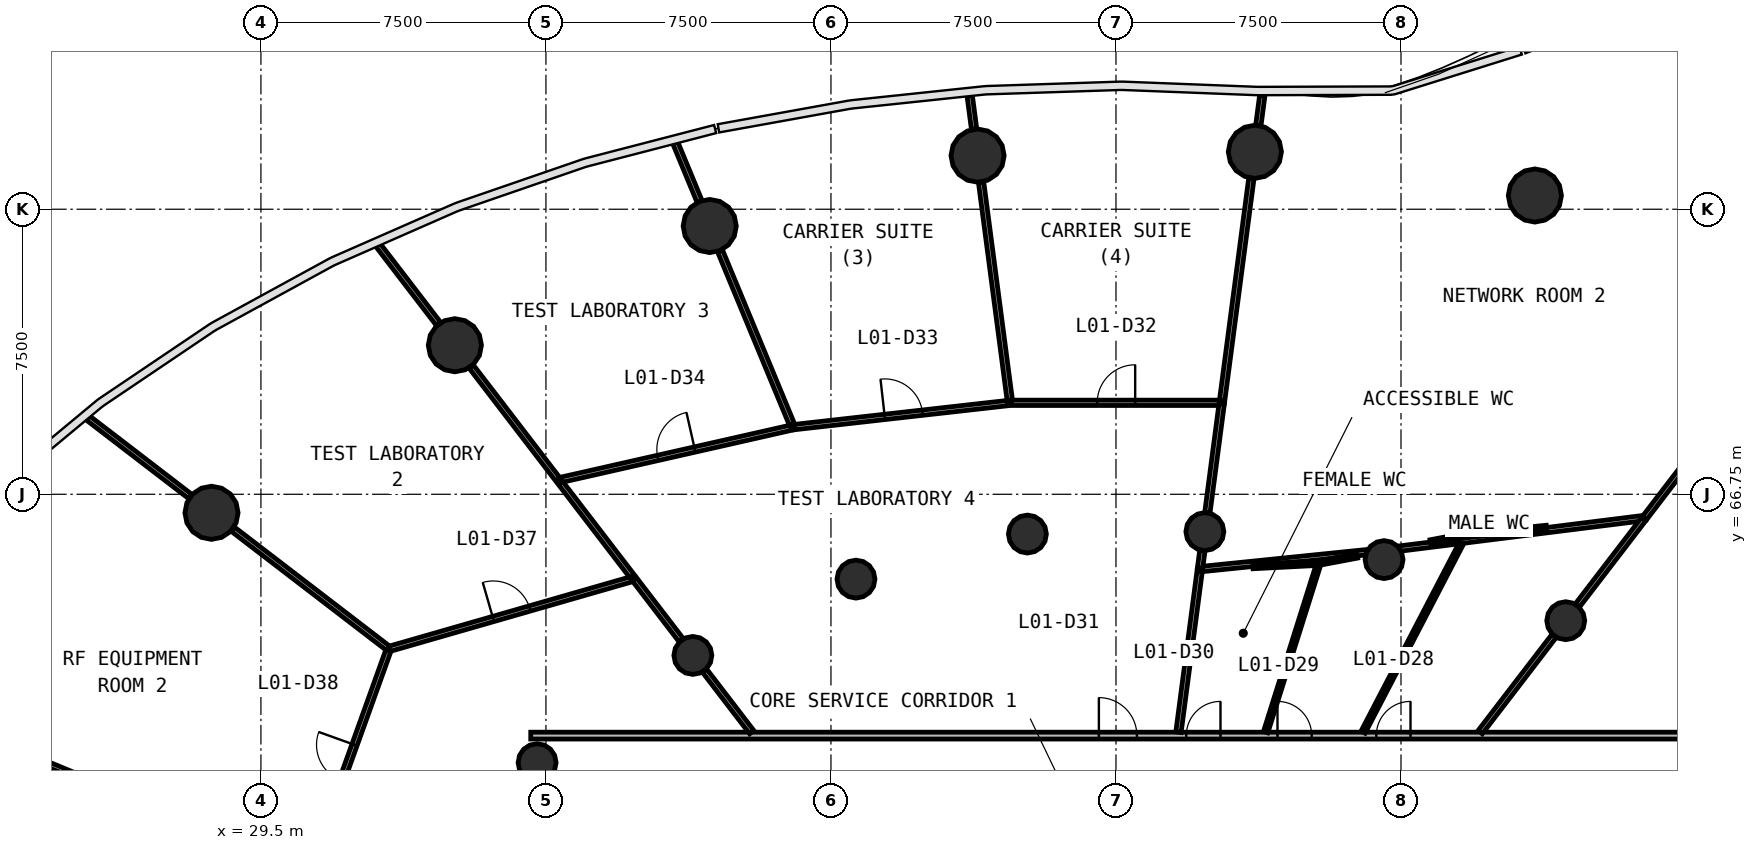
"""IFC4 building model, lengths in metres.
Left out: names, types, materials, properties, quantities, classifications, styles, units other than length and angle.
Written with IfcOpenShell. Run it as: python <this file> out.ifc"""

import sys

from ifc_helpers import new_model, si_unit, direction, frame, frame_2d, origin, origin_2d, place, context, subcontext, project, spatial, rectangle, circle, extrude, source, transform, mapped, element, fill, save


model = new_model("IFC4")
c1 = context("Model", 3, precision=1e-05, world=origin(), true_north=direction((0.0, 1.0)))
c2 = subcontext(c1, "Body", "Model", "MODEL_VIEW")
j1 = project(units=[si_unit("LENGTHUNIT", "METRE"), si_unit("PLANEANGLEUNIT", "RADIAN")], contexts=[c1])
p1 = place(None, origin())
s1 = spatial("IfcSite", under=j1, at=p1, CompositionType="ELEMENT")
p2 = place(p1, origin())
s2 = spatial("IfcBuilding", under=s1, at=p2, CompositionType="ELEMENT")
p3 = place(p2, frame((0.0, 0.0, 5.0)))
s3 = spatial("IfcBuildingStorey", under=s2, at=p3, CompositionType="ELEMENT", Elevation=5.0)
m1 = source(origin(), c2, "Body", "SweptSolid", [
    extrude(circle(Radius=0.7, at=origin_2d()), origin(), (0.0, 0.0, 1.0), 4.4),
])
for number, where, z_axis, x_axis in (
    (1, (63.023, 74.611, 0.0), (0.0, 0.0, 1.0), (1.0, 0.0, 0.0)),
    (2, (55.655, 75.761, 0.0), (0.0, 0.0, 1.0), (1.0, 0.0, 0.0)),
    (3, (48.358, 75.661, 0.0), (0.0, 0.0, 1.0), (1.0, 0.0, 0.0)),
    (4, (41.31, 73.809, 0.0), (0.0, 0.0, 1.0), (1.0, 0.0, 0.0)),
    (5, (34.604, 70.672, 0.0), (0.0, 0.0, 1.0), (1.0, 0.0, 0.0)),
    (6, (28.199, 66.263, 0.0), (0.0, 0.0, 1.0), (1.0, 0.0, 0.0)),
):
    element("IfcColumn", number, at=place(p3, frame(where, z_axis=z_axis, x_axis=x_axis)), inside=s3, PredefinedType="COLUMN", context=c2, shape_type="MappedRepresentation", body=[
        mapped(m1, transform((0.0, 0.0, 0.0), scale=1.0)),
    ])
m2 = source(origin(), c2, "Body", "SweptSolid", [
    extrude(circle(Radius=0.5, at=origin_2d()), origin(), (0.0, 0.0, 1.0), 4.4),
])
for number, where, z_axis, x_axis in (
    (7, (63.835, 63.424, 0.0), (0.0, 0.0, 1.0), (1.0, 0.0, 0.0)),
    (8, (59.055, 65.031, 0.0), (0.0, 0.0, 1.0), (1.0, 0.0, 0.0)),
    (9, (54.339, 65.767, 0.0), (0.0, 0.0, 1.0), (1.0, 0.0, 0.0)),
    (10, (49.669, 65.703, 0.0), (0.0, 0.0, 1.0), (1.0, 0.0, 0.0)),
    (11, (45.158, 64.518, 0.0), (0.0, 0.0, 1.0), (1.0, 0.0, 0.0)),
    (12, (40.866, 62.51, 0.0), (0.0, 0.0, 1.0), (1.0, 0.0, 0.0)),
    (13, (36.768, 59.688, 0.0), (0.0, 0.0, 1.0), (1.0, 0.0, 0.0)),
):
    element("IfcColumn", number, at=place(p3, frame(where, z_axis=z_axis, x_axis=x_axis)), inside=s3, PredefinedType="COLUMN", context=c2, shape_type="MappedRepresentation", body=[
        mapped(m2, transform((0.0, 0.0, 0.0), scale=1.0)),
    ])
p4 = place(p3, frame((36.6, 60.4, 0.0), z_axis=(0.0, 0.0, 1.0), x_axis=(1.0, 0.0, 0.0)))
e14 = element("IfcWall", 14, at=p4, inside=s3, PredefinedType="PARTITIONING", context=c2, shape_type="SweptSolid", body=[
    extrude(rectangle(XDim=30.8, YDim=0.18, at=frame_2d((15.4, 0.0))), origin(), (0.0, 0.0, 1.0), 3.25),
])
p5 = place(p4, frame((22.25, 0.0, 0.0)))
e15 = element("IfcOpeningElement", 15, at=p5, cuts=e14, PredefinedType="OPENING", context=c2, shape_type="SweptSolid", body=[
    extrude(rectangle(XDim=0.9, YDim=2.1, at=frame_2d((0.45, 1.05))), frame((0.0, 0.1, 0.0), z_axis=(0.0, -1.0, 0.0), x_axis=(1.0, 0.0, 0.0)), (0.0, 0.0, 1.0), 0.2),
])
p6 = place(p4, frame((19.65, 0.0, 0.0)))
e16 = element("IfcOpeningElement", 16, at=p6, cuts=e14, PredefinedType="OPENING", context=c2, shape_type="SweptSolid", body=[
    extrude(rectangle(XDim=0.9, YDim=2.1, at=frame_2d((0.45, 1.05))), frame((0.0, 0.1, 0.0), z_axis=(0.0, -1.0, 0.0), x_axis=(1.0, 0.0, 0.0)), (0.0, 0.0, 1.0), 0.2),
])
p7 = place(p4, frame((17.25, 0.0, 0.0)))
e17 = element("IfcOpeningElement", 17, at=p7, cuts=e14, PredefinedType="OPENING", context=c2, shape_type="SweptSolid", body=[
    extrude(rectangle(XDim=0.9, YDim=2.1, at=frame_2d((0.45, 1.05))), frame((0.0, 0.1, 0.0), z_axis=(0.0, -1.0, 0.0), x_axis=(1.0, 0.0, 0.0)), (0.0, 0.0, 1.0), 0.2),
])
p8 = place(p4, frame((14.95, 0.0, 0.0)))
e18 = element("IfcOpeningElement", 18, at=p8, cuts=e14, PredefinedType="OPENING", context=c2, shape_type="SweptSolid", body=[
    extrude(rectangle(XDim=1.0, YDim=2.1, at=frame_2d((0.5, 1.05))), frame((0.0, 0.1, 0.0), z_axis=(0.0, -1.0, 0.0), x_axis=(1.0, 0.0, 0.0)), (0.0, 0.0, 1.0), 0.2),
])
p9 = place(p3, frame((30.757, 56.799, 0.0), z_axis=(0.0, 0.0, 1.0), x_axis=(-0.923877426418, 0.382688516884, 0.0)))
e19 = element("IfcWall", 19, at=p9, inside=s3, PredefinedType="PARTITIONING", context=c2, shape_type="SweptSolid", body=[
    extrude(rectangle(XDim=8.389, YDim=0.14, at=frame_2d((4.194, 0.0))), origin(), (0.0, 0.0, 1.0), 3.25),
])
p10 = place(p3, frame((65.909, 66.127, 0.0), z_axis=(0.0, 0.0, 1.0), x_axis=(0.608773229352, 0.79334428543, 0.0)))
e20 = element("IfcWall", 20, at=p10, inside=s3, PredefinedType="PARTITIONING", context=c2, shape_type="SweptSolid", body=[
    extrude(rectangle(XDim=6.824, YDim=0.14, at=frame_2d((3.412, 0.0))), origin(), (0.0, 0.0, 1.0), 3.25),
])
p11 = place(p3, frame((32.869, 62.68, 0.0), z_axis=(0.0, 0.0, 1.0), x_axis=(0.96106930393, 0.27630742488, 0.0)))
e21 = element("IfcWall", 21, at=p11, inside=s3, PredefinedType="PARTITIONING", context=c2, shape_type="SweptSolid", body=[
    extrude(rectangle(XDim=6.706, YDim=0.14, at=frame_2d((3.353, 0.0))), origin(), (0.0, 0.0, 1.0), 3.25),
])
p12 = place(p11, frame((2.856, 0.0, 0.0)))
e22 = element("IfcOpeningElement", 22, at=p12, cuts=e21, PredefinedType="OPENING", context=c2, shape_type="SweptSolid", body=[
    extrude(rectangle(XDim=1.0, YDim=2.1, at=frame_2d((0.5, 1.05))), frame((0.0, 0.08, 0.0), z_axis=(0.0, -1.0, 0.0), x_axis=(1.0, 0.0, 0.0)), (0.0, 0.0, 1.0), 0.16),
])
p13 = place(p3, frame((65.88, 66.124, 0.0), z_axis=(0.0, 0.0, 1.0), x_axis=(-0.992269737838, -0.124099828249, 0.0)))
e23 = element("IfcWall", 23, at=p13, inside=s3, PredefinedType="PARTITIONING", context=c2, shape_type="SweptSolid", body=[
    extrude(rectangle(XDim=6.463, YDim=0.14, at=frame_2d((3.231, 0.0))), origin(), (0.0, 0.0, 1.0), 3.25),
])
p14 = place(p3, frame((37.332, 67.115, 0.0), z_axis=(0.0, 0.0, 1.0), x_axis=(0.975258543616, 0.221067349702, 0.0)))
e24 = element("IfcWall", 24, at=p14, inside=s3, PredefinedType="PARTITIONING", context=c2, shape_type="SweptSolid", body=[
    extrude(rectangle(XDim=6.327, YDim=0.14, at=frame_2d((3.164, 0.0))), origin(), (0.0, 0.0, 1.0), 3.25),
])
p15 = place(p14, frame((2.677, 0.0, 0.0)))
e25 = element("IfcOpeningElement", 25, at=p15, cuts=e24, PredefinedType="OPENING", context=c2, shape_type="SweptSolid", body=[
    extrude(rectangle(XDim=1.0, YDim=2.1, at=frame_2d((0.5, 1.05))), frame((0.0, 0.08, 0.0), z_axis=(0.0, -1.0, 0.0), x_axis=(1.0, 0.0, 0.0)), (0.0, 0.0, 1.0), 0.16),
])
p16 = place(p3, frame((30.781, 56.865, 0.0), z_axis=(0.0, 0.0, 1.0), x_axis=(0.338038822493, 0.941132166323, 0.0)))
e26 = element("IfcWall", 26, at=p16, inside=s3, PredefinedType="PARTITIONING", context=c2, shape_type="SweptSolid", body=[
    extrude(rectangle(XDim=6.148, YDim=0.14, at=frame_2d((3.074, 0.0))), origin(), (0.0, 0.0, 1.0), 3.25),
])
p17 = place(p16, frame((2.498, 0.0, 0.0)))
e27 = element("IfcOpeningElement", 27, at=p17, cuts=e26, PredefinedType="OPENING", context=c2, shape_type="SweptSolid", body=[
    extrude(rectangle(XDim=1.0, YDim=2.1, at=frame_2d((0.5, 1.05))), frame((0.0, 0.08, 0.0), z_axis=(0.0, -1.0, 0.0), x_axis=(1.0, 0.0, 0.0)), (0.0, 0.0, 1.0), 0.16),
])
p18 = place(p3, frame((54.785, 69.157, 0.0), z_axis=(0.0, 0.0, 1.0), x_axis=(0.130523417799, 0.991445226629, 0.0)))
e28 = element("IfcWall", 28, at=p18, inside=s3, PredefinedType="PARTITIONING", context=c2, shape_type="SweptSolid", body=[
    extrude(rectangle(XDim=5.958, YDim=0.14, at=frame_2d((2.979, 0.0))), origin(), (0.0, 0.0, 1.0), 3.25),
])
p19 = place(p3, frame((49.215, 69.157, 0.0), z_axis=(0.0, 0.0, 1.0), x_axis=(-0.130522448973, 0.991445354174, 0.0)))
e29 = element("IfcWall", 29, at=p19, inside=s3, PredefinedType="PARTITIONING", context=c2, shape_type="SweptSolid", body=[
    extrude(rectangle(XDim=5.856, YDim=0.14, at=frame_2d((2.928, 0.0))), origin(), (0.0, 0.0, 1.0), 3.25),
])
p20 = place(p3, frame((43.532, 68.518, 0.0), z_axis=(0.0, 0.0, 1.0), x_axis=(0.993732576672, 0.111783567936, 0.0)))
e30 = element("IfcWall", 30, at=p20, inside=s3, PredefinedType="PARTITIONING", context=c2, shape_type="SweptSolid", body=[
    extrude(rectangle(XDim=5.648, YDim=0.14, at=frame_2d((2.824, 0.0))), origin(), (0.0, 0.0, 1.0), 3.25),
])
p21 = place(p20, frame((2.398, 0.0, 0.0)))
e31 = element("IfcOpeningElement", 31, at=p21, cuts=e30, PredefinedType="OPENING", context=c2, shape_type="SweptSolid", body=[
    extrude(rectangle(XDim=1.0, YDim=2.1, at=frame_2d((0.5, 1.05))), frame((0.0, 0.08, 0.0), z_axis=(0.0, -1.0, 0.0), x_axis=(1.0, 0.0, 0.0)), (0.0, 0.0, 1.0), 0.16),
])
p22 = place(p3, frame((49.245, 69.157, 0.0), z_axis=(0.0, 0.0, 1.0), x_axis=(1.0, 0.0, 0.0)))
e32 = element("IfcWall", 32, at=p22, inside=s3, PredefinedType="PARTITIONING", context=c2, shape_type="SweptSolid", body=[
    extrude(rectangle(XDim=5.511, YDim=0.14, at=frame_2d((2.755, 0.0))), origin(), (0.0, 0.0, 1.0), 3.25),
])
p23 = place(p22, frame((2.261, 0.0, 0.0)))
e33 = element("IfcOpeningElement", 33, at=p23, cuts=e32, PredefinedType="OPENING", context=c2, shape_type="SweptSolid", body=[
    extrude(rectangle(XDim=1.0, YDim=2.1, at=frame_2d((0.5, 1.05))), frame((0.0, 0.08, 0.0), z_axis=(0.0, -1.0, 0.0), x_axis=(1.0, 0.0, 0.0)), (0.0, 0.0, 1.0), 0.16),
])
p24 = place(p3, frame((32.845, 62.698, 0.0), z_axis=(0.0, 0.0, 1.0), x_axis=(-0.793372133446, 0.60873693651, 0.0)))
e34 = element("IfcWall", 34, at=p24, inside=s3, PredefinedType="PARTITIONING", context=c2, shape_type="SweptSolid", body=[
    extrude(rectangle(XDim=5.152, YDim=0.14, at=frame_2d((2.576, 0.0))), origin(), (0.0, 0.0, 1.0), 3.25),
])
p25 = place(p3, frame((43.476, 68.58, 0.0), z_axis=(0.0, 0.0, 1.0), x_axis=(-0.382679643563, 0.923881101875, 0.0)))
e35 = element("IfcWall", 35, at=p25, inside=s3, PredefinedType="PARTITIONING", context=c2, shape_type="SweptSolid", body=[
    extrude(rectangle(XDim=4.955, YDim=0.14, at=frame_2d((2.477, 0.0))), origin(), (0.0, 0.0, 1.0), 3.25),
])
p26 = place(p3, frame((53.644, 60.49, 0.0), z_axis=(0.0, 0.0, 1.0), x_axis=(0.130555258319, 0.991441034316, 0.0)))
e36 = element("IfcWall", 36, at=p26, inside=s3, PredefinedType="PARTITIONING", context=c2, shape_type="SweptSolid", body=[
    extrude(rectangle(XDim=4.325, YDim=0.14, at=frame_2d((2.163, 0.0))), origin(), (0.0, 0.0, 1.0), 3.25),
])
p27 = place(p3, frame((58.588, 65.225, 0.0), z_axis=(0.0, 0.0, 1.0), x_axis=(-0.994844610693, -0.101411047601, 0.0)))
e37 = element("IfcWall", 37, at=p27, inside=s3, PredefinedType="PARTITIONING", context=c2, shape_type="SweptSolid", body=[
    extrude(rectangle(XDim=4.372, YDim=0.14, at=frame_2d((2.186, 0.0))), origin(), (0.0, 0.0, 1.0), 3.25),
])
p28 = place(p3, frame((37.314, 67.139, 0.0), z_axis=(0.0, 0.0, 1.0), x_axis=(-0.608769216059, 0.793347365017, 0.0)))
e38 = element("IfcWall", 38, at=p28, inside=s3, PredefinedType="PARTITIONING", context=c2, shape_type="SweptSolid", body=[
    extrude(rectangle(XDim=3.749, YDim=0.14, at=frame_2d((1.874, 0.0))), origin(), (0.0, 0.0, 1.0), 3.25),
])
p29 = place(p3, frame((27.641, 66.691, 0.0), z_axis=(0.0, 0.0, 1.0), x_axis=(-0.793332688102, 0.60878834252, 0.0)))
e39 = element("IfcWall", 39, at=p29, inside=s3, PredefinedType="PARTITIONING", context=c2, shape_type="SweptSolid", body=[
    extrude(rectangle(XDim=3.404, YDim=0.14, at=frame_2d((1.702, 0.0))), origin(), (0.0, 0.0, 1.0), 3.25),
])
p30 = place(p3, frame((61.584, 60.49, 0.0), z_axis=(0.0, 0.0, 1.0), x_axis=(0.60874605662, 0.793365135703, 0.0)))
e40 = element("IfcWall", 40, at=p30, inside=s3, PredefinedType="PARTITIONING", context=c2, shape_type="SweptSolid", body=[
    extrude(rectangle(XDim=3.194, YDim=0.14, at=frame_2d((1.597, 0.0))), origin(), (0.0, 0.0, 1.0), 3.25),
])
p31 = place(p3, frame((39.268, 64.592, 0.0), z_axis=(0.0, 0.0, 1.0), x_axis=(-0.608775029145, 0.793342904355, 0.0)))
e41 = element("IfcWall", 41, at=p31, inside=s3, PredefinedType="PARTITIONING", context=c2, shape_type="SweptSolid", body=[
    extrude(rectangle(XDim=3.103, YDim=0.14, at=frame_2d((1.552, 0.0))), origin(), (0.0, 0.0, 1.0), 3.25),
])
p32 = place(p3, frame((54.405, 66.267, 0.0), z_axis=(0.0, 0.0, 1.0), x_axis=(0.130511436872, 0.99144680384, 0.0)))
e42 = element("IfcWall", 42, at=p32, inside=s3, PredefinedType="PARTITIONING", context=c2, shape_type="SweptSolid", body=[
    extrude(rectangle(XDim=2.885, YDim=0.14, at=frame_2d((1.442, 0.0))), origin(), (0.0, 0.0, 1.0), 3.25),
])
p33 = place(p3, frame((64.142, 63.824, 0.0), z_axis=(0.0, 0.0, 1.0), x_axis=(0.608770075861, 0.793346705253, 0.0)))
e43 = element("IfcWall", 43, at=p33, inside=s3, PredefinedType="PARTITIONING", context=c2, shape_type="SweptSolid", body=[
    extrude(rectangle(XDim=2.861, YDim=0.14, at=frame_2d((1.431, 0.0))), origin(), (0.0, 0.0, 1.0), 3.25),
])
p34 = place(p3, frame((34.175, 71.23, 0.0), z_axis=(0.0, 0.0, 1.0), x_axis=(-0.608811983243, 0.793314546104, 0.0)))
e44 = element("IfcWall", 44, at=p34, inside=s3, PredefinedType="PARTITIONING", context=c2, shape_type="SweptSolid", body=[
    extrude(rectangle(XDim=2.627, YDim=0.14, at=frame_2d((1.313, 0.0))), origin(), (0.0, 0.0, 1.0), 3.25),
])
p35 = place(p3, frame((42.416, 60.49, 0.0), z_axis=(0.0, 0.0, 1.0), x_axis=(-0.608727763541, 0.793379171578, 0.0)))
e45 = element("IfcWall", 45, at=p35, inside=s3, PredefinedType="PARTITIONING", context=c2, shape_type="SweptSolid", body=[
    extrude(rectangle(XDim=2.042, YDim=0.14, at=frame_2d((1.021, 0.0))), origin(), (0.0, 0.0, 1.0), 3.25),
])
p36 = place(p3, frame((40.559, 62.91, 0.0), z_axis=(0.0, 0.0, 1.0), x_axis=(-0.608726567924, 0.793380088926, 0.0)))
e46 = element("IfcWall", 46, at=p36, inside=s3, PredefinedType="PARTITIONING", context=c2, shape_type="SweptSolid", body=[
    extrude(rectangle(XDim=2.015, YDim=0.14, at=frame_2d((1.007, 0.0))), origin(), (0.0, 0.0, 1.0), 3.25),
])
p37 = place(p3, frame((41.04, 74.46, 0.0), z_axis=(0.0, 0.0, 1.0), x_axis=(-0.382571117301, 0.923926046936, 0.0)))
e47 = element("IfcWall", 47, at=p37, inside=s3, PredefinedType="PARTITIONING", context=c2, shape_type="SweptSolid", body=[
    extrude(rectangle(XDim=1.671, YDim=0.14, at=frame_2d((0.836, 0.0))), origin(), (0.0, 0.0, 1.0), 3.25),
])
p38 = place(p3, frame((48.266, 76.36, 0.0), z_axis=(0.0, 0.0, 1.0), x_axis=(-0.13059675412, 0.991435569169, 0.0)))
e48 = element("IfcWall", 48, at=p38, inside=s3, PredefinedType="PARTITIONING", context=c2, shape_type="SweptSolid", body=[
    extrude(rectangle(XDim=0.888, YDim=0.14, at=frame_2d((0.444, 0.0))), origin(), (0.0, 0.0, 1.0), 3.25),
])
p39 = place(p3, frame((55.747, 76.46, 0.0), z_axis=(0.0, 0.0, 1.0), x_axis=(0.130598952658, 0.991435279564, 0.0)))
e49 = element("IfcWall", 49, at=p39, inside=s3, PredefinedType="PARTITIONING", context=c2, shape_type="SweptSolid", body=[
    extrude(rectangle(XDim=0.787, YDim=0.14, at=frame_2d((0.394, 0.0))), origin(), (0.0, 0.0, 1.0), 3.25),
])
p40 = place(p3, frame((54.213, 64.808, 0.0), z_axis=(0.0, 0.0, 1.0), x_axis=(0.130263517927, 0.991479407702, 0.0)))
e50 = element("IfcWall", 50, at=p40, inside=s3, PredefinedType="PARTITIONING", context=c2, shape_type="SweptSolid", body=[
    extrude(rectangle(XDim=0.463, YDim=0.14, at=frame_2d((0.231, 0.0))), origin(), (0.0, 0.0, 1.0), 3.25),
])
p41 = place(p3, frame((58.502, 60.49, 0.0), z_axis=(0.0, 0.0, 1.0), x_axis=(0.461744214497, 0.887013123002, 0.0)))
e51 = element("IfcWall", 51, at=p41, inside=s3, PredefinedType="PARTITIONING", context=c2, shape_type="SweptSolid", body=[
    extrude(rectangle(XDim=5.596, YDim=0.12, at=frame_2d((2.798, 0.0))), origin(), (0.0, 0.0, 1.0), 3.25),
])
p42 = place(p3, frame((55.938, 60.49, 0.0), z_axis=(0.0, 0.0, 1.0), x_axis=(0.300723137203, 0.95371148402, 0.0)))
e52 = element("IfcWall", 52, at=p42, inside=s3, PredefinedType="PARTITIONING", context=c2, shape_type="SweptSolid", body=[
    extrude(rectangle(XDim=4.666, YDim=0.12, at=frame_2d((2.333, 0.0))), origin(), (0.0, 0.0, 1.0), 3.25),
])
p43 = place(p3, frame((63.328, 65.875, 0.0), z_axis=(0.0, 0.0, 1.0), x_axis=(-0.995247178859, -0.097380968234, 0.0)))
e53 = element("IfcWall", 53, at=p43, inside=s3, PredefinedType="PARTITIONING", context=c2, shape_type="SweptSolid", body=[
    extrude(rectangle(XDim=2.141, YDim=0.12, at=frame_2d((1.071, 0.0))), origin(), (0.0, 0.0, 1.0), 3.25),
])
p44 = place(p3, frame((57.277, 64.937, 0.0), z_axis=(0.0, 0.0, 1.0), x_axis=(-0.998675207723, -0.051457064418, 0.0)))
e54 = element("IfcWall", 54, at=p44, inside=s3, PredefinedType="PARTITIONING", context=c2, shape_type="SweptSolid", body=[
    extrude(rectangle(XDim=1.675, YDim=0.12, at=frame_2d((0.837, 0.0))), origin(), (0.0, 0.0, 1.0), 3.25),
])
p45 = place(p3, frame((61.167, 65.661, 0.0), z_axis=(0.0, 0.0, 1.0), x_axis=(-0.982722635862, -0.18508436175, 0.0)))
e55 = element("IfcWall", 55, at=p45, inside=s3, PredefinedType="PARTITIONING", context=c2, shape_type="SweptSolid", body=[
    extrude(rectangle(XDim=0.907, YDim=0.12, at=frame_2d((0.454, 0.0))), origin(), (0.0, 0.0, 1.0), 3.25),
])
p46 = place(p3, frame((58.349, 65.13, 0.0), z_axis=(0.0, 0.0, 1.0), x_axis=(-0.982618634889, -0.185635714153, 0.0)))
e56 = element("IfcWall", 56, at=p46, inside=s3, PredefinedType="PARTITIONING", context=c2, shape_type="SweptSolid", body=[
    extrude(rectangle(XDim=0.996, YDim=0.12, at=frame_2d((0.498, 0.0))), origin(), (0.0, 0.0, 1.0), 3.25),
])
m3 = source(origin(), c2, "Body", "SweptSolid", [
    extrude(rectangle(XDim=0.9, YDim=2.1, at=frame_2d((0.45, 1.05))), frame((0.0, 0.025, 0.0), z_axis=(0.0, -1.0, 0.0), x_axis=(1.0, 0.0, 0.0)), (0.0, 0.0, 1.0), 0.05),
])
p47 = place(p5, origin())
e57 = element("IfcDoor", 57, at=p47, inside=s3, OperationType="SINGLE_SWING_RIGHT", PredefinedType="DOOR", context=c2, shape_type="MappedRepresentation", body=[
    mapped(m3, transform((0.0, 0.0, 0.0), scale=1.0)),
])
fill(e15, e57)
p48 = place(p6, origin())
e58 = element("IfcDoor", 58, at=p48, inside=s3, OperationType="SINGLE_SWING_LEFT", PredefinedType="DOOR", context=c2, shape_type="MappedRepresentation", body=[
    mapped(m3, transform((0.0, 0.0, 0.0), scale=1.0)),
])
fill(e16, e58)
p49 = place(p7, origin())
e59 = element("IfcDoor", 59, at=p49, inside=s3, OperationType="SINGLE_SWING_RIGHT", PredefinedType="DOOR", context=c2, shape_type="MappedRepresentation", body=[
    mapped(m3, transform((0.0, 0.0, 0.0), scale=1.0)),
])
fill(e17, e59)
m4 = source(origin(), c2, "Body", "SweptSolid", [
    extrude(rectangle(XDim=1.0, YDim=2.1, at=frame_2d((0.5, 1.05))), frame((0.0, 0.025, 0.0), z_axis=(0.0, -1.0, 0.0), x_axis=(1.0, 0.0, 0.0)), (0.0, 0.0, 1.0), 0.05),
])
p50 = place(p8, origin())
e60 = element("IfcDoor", 60, at=p50, inside=s3, OperationType="SINGLE_SWING_LEFT", PredefinedType="DOOR", context=c2, shape_type="MappedRepresentation", body=[
    mapped(m4, transform((0.0, 0.0, 0.0), scale=1.0)),
])
fill(e18, e60)
p51 = place(p23, origin())
e61 = element("IfcDoor", 61, at=p51, inside=s3, OperationType="SINGLE_SWING_RIGHT", PredefinedType="DOOR", context=c2, shape_type="MappedRepresentation", body=[
    mapped(m4, transform((0.0, 0.0, 0.0), scale=1.0)),
])
fill(e33, e61)
p52 = place(p21, origin())
e62 = element("IfcDoor", 62, at=p52, inside=s3, OperationType="SINGLE_SWING_LEFT", PredefinedType="DOOR", context=c2, shape_type="MappedRepresentation", body=[
    mapped(m4, transform((0.0, 0.0, 0.0), scale=1.0)),
])
fill(e31, e62)
p53 = place(p15, origin())
e63 = element("IfcDoor", 63, at=p53, inside=s3, OperationType="SINGLE_SWING_RIGHT", PredefinedType="DOOR", context=c2, shape_type="MappedRepresentation", body=[
    mapped(m4, transform((0.0, 0.0, 0.0), scale=1.0)),
])
fill(e25, e63)
p54 = place(p12, origin())
e64 = element("IfcDoor", 64, at=p54, inside=s3, OperationType="SINGLE_SWING_LEFT", PredefinedType="DOOR", context=c2, shape_type="MappedRepresentation", body=[
    mapped(m4, transform((0.0, 0.0, 0.0), scale=1.0)),
])
fill(e22, e64)
p55 = place(p17, origin())
e65 = element("IfcDoor", 65, at=p55, inside=s3, OperationType="SINGLE_SWING_RIGHT", PredefinedType="DOOR", context=c2, shape_type="MappedRepresentation", body=[
    mapped(m4, transform((0.0, 0.0, 0.0), scale=1.0)),
])
fill(e27, e65)
save(model, sys.argv[1])
